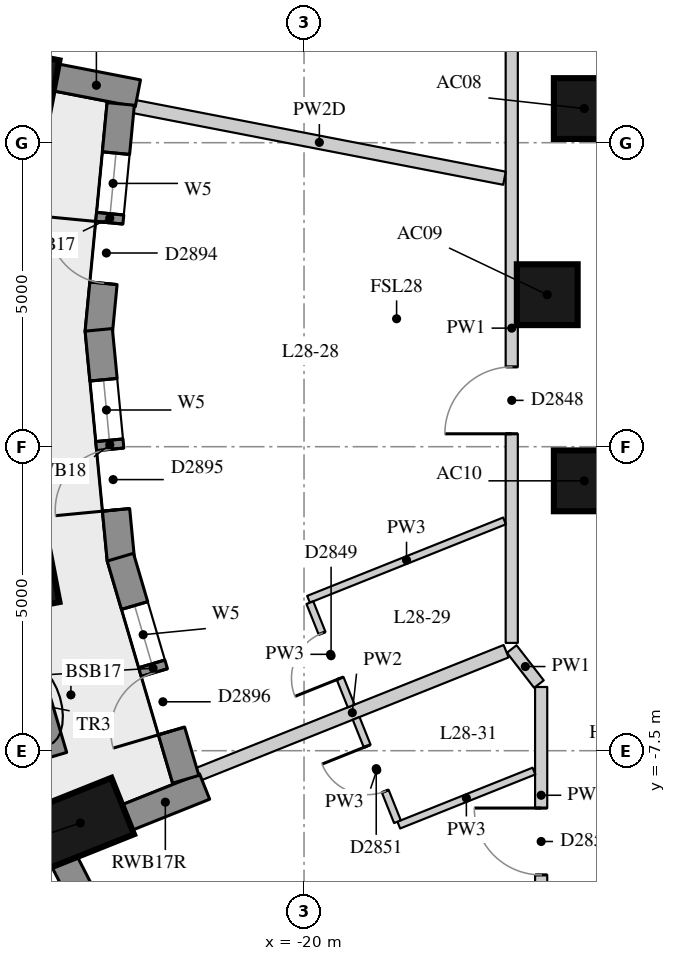
"""IFC4 building model, lengths in metres.
Left out: names, types, materials, properties, quantities, classifications, styles, units other than length and angle.
Written with IfcOpenShell. Run it as: python <this file> out.ifc"""

import sys

from ifc_helpers import new_model, si_unit, direction, frame, frame_2d, origin, origin_2d, place, context, subcontext, project, spatial, rectangle, extrude, element, fill, save


model = new_model("IFC4")
c1 = context("Model", 3, precision=1e-05, world=origin(), true_north=direction((0.0, 1.0)))
c2 = subcontext(c1, "Body", "Model", "MODEL_VIEW")
j1 = project(units=[si_unit("LENGTHUNIT", "METRE"), si_unit("PLANEANGLEUNIT", "RADIAN")], contexts=[c1])
p1 = place(None, origin())
s1 = spatial("IfcSite", under=j1, at=p1, CompositionType="ELEMENT")
p2 = place(p1, origin())
s2 = spatial("IfcBuilding", under=s1, at=p2, CompositionType="ELEMENT")
p3 = place(p2, frame((0.0, 0.0, 102.1)))
s3 = spatial("IfcBuildingStorey", under=s2, at=p3, CompositionType="ELEMENT", Elevation=102.1)
for number, where, z_axis, x_axis in (
    (1, (-24.854, 3.507, 0.0), (0.0, 0.0, 1.0), (-0.982, 0.19, 0.0)),
    (2, (-24.854, -4.707, 0.0), (0.0, 0.0, 1.0), (-0.982, -0.19, 0.0)),
    (3, (-23.679, -8.689, 0.0), (0.0, 0.0, 1.0), (-0.929, -0.371, 0.0)),
):
    element("IfcColumn", number, at=place(p3, frame(where, z_axis=z_axis, x_axis=x_axis)), inside=s3, PredefinedType="COLUMN", context=c2, shape_type="SweptSolid", body=[
        extrude(rectangle(XDim=1.5, YDim=1.0, at=origin_2d()), origin(), (0.0, 0.0, 1.0), 3.3),
    ])
for number, where, z_axis, x_axis in (
    (4, (-15.391, 3.062, 0.0), (0.0, 0.0, 1.0), (1.0, 0.0, 0.0)),
    (5, (-16.0, 0.0, 0.0), (0.0, 0.0, 1.0), (1.0, 0.0, 0.0)),
    (6, (-15.391, -3.062, 0.0), (0.0, 0.0, 1.0), (1.0, 0.0, 0.0)),
):
    element("IfcColumn", number, at=place(p3, frame(where, z_axis=z_axis, x_axis=x_axis)), inside=s3, PredefinedType="COLUMN", context=c2, shape_type="SweptSolid", body=[
        extrude(rectangle(XDim=1.0, YDim=1.0, at=origin_2d()), origin(), (0.0, 0.0, 1.0), 3.3),
    ])
p4 = place(p3, frame((-23.945, -9.312, 0.0), z_axis=(0.0, 0.0, 1.0), x_axis=(0.456828186229, -0.889554949549, 0.0)))
e7 = element("IfcWall", 7, at=p4, inside=s3, PredefinedType="SOLIDWALL", context=c2, shape_type="SweptSolid", body=[
    extrude(rectangle(XDim=3.333, YDim=0.45, at=frame_2d((1.667, 0.0))), origin(), (0.0, 0.0, 1.0), 3.02),
])
p5 = place(p4, frame((0.666, 0.0, 0.4)))
e8 = element("IfcOpeningElement", 8, at=p5, cuts=e7, PredefinedType="OPENING", context=c2, shape_type="SweptSolid", body=[
    extrude(rectangle(XDim=2.0, YDim=1.75, at=frame_2d((1.0, 0.875))), frame((0.0, 0.235, 0.0), z_axis=(0.0, -1.0, 0.0), x_axis=(1.0, 0.0, 0.0)), (0.0, 0.0, 1.0), 0.47),
])
p6 = place(p3, frame((-24.097, 3.576, 0.0), z_axis=(0.0, 0.0, 1.0), x_axis=(0.981777736615, -0.190032828447, 0.0)))
e9 = element("IfcWall", 9, at=p6, inside=s3, PredefinedType="SOLIDWALL", context=c2, shape_type="SweptSolid", body=[
    extrude(rectangle(XDim=1.39, YDim=0.45, at=frame_2d((0.695, 0.0))), origin(), (0.0, 0.0, 1.0), 2.47),
])
p7 = place(p3, frame((-22.926, -8.605, 0.0), z_axis=(0.0, 0.0, 1.0), x_axis=(0.928549333349, 0.371209018665, 0.0)))
e10 = element("IfcWall", 10, at=p7, inside=s3, PredefinedType="SOLIDWALL", context=c2, shape_type="SweptSolid", body=[
    extrude(rectangle(XDim=1.39, YDim=0.45, at=frame_2d((0.695, 0.0))), origin(), (0.0, 0.0, 1.0), 3.02),
])
p8 = place(p3, frame((-23.015, 3.138, 0.0), z_axis=(0.0, 0.0, 1.0), x_axis=(-0.095675452713, -0.995412581671, 0.0)))
e11 = element("IfcWall", 11, at=p8, inside=s3, PredefinedType="SOLIDWALL", context=c2, shape_type="SweptSolid", body=[
    extrude(rectangle(XDim=3.777, YDim=0.45, at=frame_2d((1.888, 0.0))), origin(), (0.0, 0.0, 1.0), 3.02),
])
p9 = place(p8, frame((0.813, 0.0, 0.4)))
e12 = element("IfcOpeningElement", 12, at=p9, cuts=e11, PredefinedType="OPENING", context=c2, shape_type="SweptSolid", body=[
    extrude(rectangle(XDim=1.0, YDim=1.75, at=frame_2d((0.5, 0.875))), frame((0.0, 0.235, 0.0), z_axis=(0.0, -1.0, 0.0), x_axis=(1.0, 0.0, 0.0)), (0.0, 0.0, 1.0), 0.47),
])
p10 = place(p8, frame((1.963, 0.0, 0.0)))
e13 = element("IfcOpeningElement", 13, at=p10, cuts=e11, PredefinedType="OPENING", context=c2, shape_type="SweptSolid", body=[
    extrude(rectangle(XDim=1.0, YDim=2.15, at=frame_2d((0.5, 1.075))), frame((0.0, 0.235, 0.0), z_axis=(0.0, -1.0, 0.0), x_axis=(1.0, 0.0, 0.0)), (0.0, 0.0, 1.0), 0.47),
])
p11 = place(p3, frame((-23.376, -0.578, 0.0), z_axis=(0.0, 0.0, 1.0), x_axis=(0.095646267275, -0.995415386437, 0.0)))
e14 = element("IfcWall", 14, at=p11, inside=s3, PredefinedType="SOLIDWALL", context=c2, shape_type="SweptSolid", body=[
    extrude(rectangle(XDim=3.798, YDim=0.45, at=frame_2d((1.899, 0.0))), origin(), (0.0, 0.0, 1.0), 3.02),
])
p12 = place(p11, frame((0.824, 0.0, 0.4)))
e15 = element("IfcOpeningElement", 15, at=p12, cuts=e14, PredefinedType="OPENING", context=c2, shape_type="SweptSolid", body=[
    extrude(rectangle(XDim=1.0, YDim=1.75, at=frame_2d((0.5, 0.875))), frame((0.0, 0.235, 0.0), z_axis=(0.0, -1.0, 0.0), x_axis=(1.0, 0.0, 0.0)), (0.0, 0.0, 1.0), 0.47),
])
p13 = place(p11, frame((1.974, 0.0, 0.0)))
e16 = element("IfcOpeningElement", 16, at=p13, cuts=e14, PredefinedType="OPENING", context=c2, shape_type="SweptSolid", body=[
    extrude(rectangle(XDim=1.0, YDim=2.15, at=frame_2d((0.5, 1.075))), frame((0.0, 0.235, 0.0), z_axis=(0.0, -1.0, 0.0), x_axis=(1.0, 0.0, 0.0)), (0.0, 0.0, 1.0), 0.47),
])
p14 = place(p3, frame((-23.021, -4.317, 0.0), z_axis=(0.0, 0.0, 1.0), x_axis=(0.282391916129, -0.959299122123, 0.0)))
e17 = element("IfcWall", 17, at=p14, inside=s3, PredefinedType="SOLIDWALL", context=c2, shape_type="SweptSolid", body=[
    extrude(rectangle(XDim=3.808, YDim=0.45, at=frame_2d((1.904, 0.0))), origin(), (0.0, 0.0, 1.0), 3.02),
])
p15 = place(p14, frame((0.829, 0.0, 0.4)))
e18 = element("IfcOpeningElement", 18, at=p15, cuts=e17, PredefinedType="OPENING", context=c2, shape_type="SweptSolid", body=[
    extrude(rectangle(XDim=1.0, YDim=1.75, at=frame_2d((0.5, 0.875))), frame((0.0, 0.235, 0.0), z_axis=(0.0, -1.0, 0.0), x_axis=(1.0, 0.0, 0.0)), (0.0, 0.0, 1.0), 0.47),
])
p16 = place(p14, frame((1.979, 0.0, 0.0)))
e19 = element("IfcOpeningElement", 19, at=p16, cuts=e17, PredefinedType="OPENING", context=c2, shape_type="SweptSolid", body=[
    extrude(rectangle(XDim=1.0, YDim=2.15, at=frame_2d((0.5, 1.075))), frame((0.0, 0.235, 0.0), z_axis=(0.0, -1.0, 0.0), x_axis=(1.0, 0.0, 0.0)), (0.0, 0.0, 1.0), 0.47),
])
p17 = place(p3, frame((-24.749, -5.901, 0.0), z_axis=(0.0, 0.0, 1.0), x_axis=(0.283076786659, -0.959097248904, 0.0)))
e20 = element("IfcWall", 20, at=p17, inside=s3, PredefinedType="USERDEFINED", context=c2, shape_type="SweptSolid", body=[
    extrude(rectangle(XDim=1.8, YDim=0.7, at=frame_2d((0.9, 0.0))), origin(), (0.0, 0.0, 1.0), 0.75),
])
p18 = place(p3, frame((-16.1, -10.013, 0.0), z_axis=(0.0, 0.0, 1.0), x_axis=(0.0, 1.0, 0.0)))
e21 = element("IfcWall", 21, at=p18, inside=s3, PredefinedType="PARTITIONING", context=c2, shape_type="SweptSolid", body=[
    extrude(rectangle(XDim=3.561, YDim=0.2, at=frame_2d((1.781, 0.0))), origin(), (0.0, 0.0, 1.0), 3.02),
])
p19 = place(p18, frame((0.47, 0.0, 0.0)))
e22 = element("IfcOpeningElement", 22, at=p19, cuts=e21, PredefinedType="OPENING", context=c2, shape_type="SweptSolid", body=[
    extrude(rectangle(XDim=1.1, YDim=2.1, at=frame_2d((0.55, 1.05))), frame((0.0, 0.11, 0.0), z_axis=(0.0, -1.0, 0.0), x_axis=(1.0, 0.0, 0.0)), (0.0, 0.0, 1.0), 0.22),
])
p20 = place(p3, frame((-16.137, -6.405, 0.0), z_axis=(0.0, 0.0, 1.0), x_axis=(-0.612388914667, 0.790556650211, 0.0)))
e23 = element("IfcWall", 23, at=p20, inside=s3, PredefinedType="PARTITIONING", context=c2, shape_type="SweptSolid", body=[
    extrude(rectangle(XDim=0.73, YDim=0.2, at=frame_2d((0.365, 0.0))), origin(), (0.0, 0.0, 1.0), 3.02),
])
p21 = place(p3, frame((-16.584, -5.727, 0.0), z_axis=(0.0, 0.0, 1.0), x_axis=(0.0, 1.0, 0.0)))
e24 = element("IfcWall", 24, at=p21, inside=s3, PredefinedType="PARTITIONING", context=c2, shape_type="SweptSolid", body=[
    extrude(rectangle(XDim=10.354, YDim=0.2, at=frame_2d((5.177, 0.0))), origin(), (0.0, 0.0, 1.0), 3.02),
])
p22 = place(p21, frame((3.439, 0.0, 0.0)))
e25 = element("IfcOpeningElement", 25, at=p22, cuts=e24, PredefinedType="OPENING", context=c2, shape_type="SweptSolid", body=[
    extrude(rectangle(XDim=1.1, YDim=2.1, at=frame_2d((0.55, 1.05))), frame((0.0, 0.11, 0.0), z_axis=(0.0, -1.0, 0.0), x_axis=(1.0, 0.0, 0.0)), (0.0, 0.0, 1.0), 0.22),
])
p23 = place(p3, frame((-22.793, 3.095, 0.0), z_axis=(0.0, 0.0, 1.0), x_axis=(0.98175994641, -0.190124715976, 0.0)))
e26 = element("IfcWall", 26, at=p23, inside=s3, PredefinedType="PARTITIONING", context=c2, shape_type="SweptSolid", body=[
    extrude(rectangle(XDim=6.202, YDim=0.22, at=frame_2d((3.101, 0.0))), origin(), (0.0, 0.0, 1.0), 2.47),
])
p24 = place(p3, frame((-21.736, -7.887, 0.0), z_axis=(0.0, 0.0, 1.0), x_axis=(0.928513770625, 0.371297963583, 0.0)))
e27 = element("IfcWall", 27, at=p24, inside=s3, PredefinedType="PARTITIONING", context=c2, shape_type="SweptSolid", body=[
    extrude(rectangle(XDim=5.448, YDim=0.22, at=frame_2d((2.724, 0.0))), origin(), (0.0, 0.0, 1.0), 3.02),
])
p25 = place(p3, frame((-16.703, -3.721, 0.0), z_axis=(0.0, 0.0, 1.0), x_axis=(-0.928539725362, -0.371233051362, 0.0)))
e28 = element("IfcWall", 28, at=p25, inside=s3, PredefinedType="PARTITIONING", context=c2, shape_type="SweptSolid", body=[
    extrude(rectangle(XDim=3.472, YDim=0.12, at=frame_2d((1.736, 0.0))), origin(), (0.0, 0.0, 1.0), 3.02),
])
p26 = place(p3, frame((-16.219, -7.835, 0.0), z_axis=(0.0, 0.0, 1.0), x_axis=(-0.928532951542, -0.371249993806, 0.0)))
e29 = element("IfcWall", 29, at=p26, inside=s3, PredefinedType="PARTITIONING", context=c2, shape_type="SweptSolid", body=[
    extrude(rectangle(XDim=2.394, YDim=0.12, at=frame_2d((1.197, 0.0))), origin(), (0.0, 0.0, 1.0), 3.02),
])
p27 = place(p3, frame((-19.904, -5.065, 0.0), z_axis=(0.0, 0.0, 1.0), x_axis=(0.371275666236, -0.92852268667, 0.0)))
e30 = element("IfcWall", 30, at=p27, inside=s3, PredefinedType="PARTITIONING", context=c2, shape_type="SweptSolid", body=[
    extrude(rectangle(XDim=1.83, YDim=0.12, at=frame_2d((0.915, 0.0))), origin(), (0.0, 0.0, 1.0), 3.02),
])
p28 = place(p27, frame((0.54, 0.0, 0.0)))
e31 = element("IfcOpeningElement", 31, at=p28, cuts=e30, PredefinedType="OPENING", context=c2, shape_type="SweptSolid", body=[
    extrude(rectangle(XDim=0.8, YDim=2.1, at=frame_2d((0.4, 1.05))), frame((0.0, 0.07, 0.0), z_axis=(0.0, -1.0, 0.0), x_axis=(1.0, 0.0, 0.0)), (0.0, 0.0, 1.0), 0.14),
])
p29 = place(p3, frame((-18.464, -8.668, 0.0), z_axis=(0.0, 0.0, 1.0), x_axis=(-0.371275666236, 0.92852268667, 0.0)))
e32 = element("IfcWall", 32, at=p29, inside=s3, PredefinedType="PARTITIONING", context=c2, shape_type="SweptSolid", body=[
    extrude(rectangle(XDim=1.83, YDim=0.12, at=frame_2d((0.915, 0.0))), origin(), (0.0, 0.0, 1.0), 3.02),
])
p30 = place(p29, frame((0.54, 0.0, 0.0)))
e33 = element("IfcOpeningElement", 33, at=p30, cuts=e32, PredefinedType="OPENING", context=c2, shape_type="SweptSolid", body=[
    extrude(rectangle(XDim=0.8, YDim=2.1, at=frame_2d((0.4, 1.05))), frame((0.0, 0.07, 0.0), z_axis=(0.0, -1.0, 0.0), x_axis=(1.0, 0.0, 0.0)), (0.0, 0.0, 1.0), 0.14),
])
p31 = place(p9, origin())
e34 = element("IfcWindow", 34, at=p31, inside=s3, PartitioningType="SINGLE_PANEL", PredefinedType="WINDOW", context=c2, shape_type="SweptSolid", body=[
    extrude(rectangle(XDim=1.0, YDim=1.75, at=frame_2d((0.5, 0.875))), frame((0.0, 0.035, 0.0), z_axis=(0.0, -1.0, 0.0), x_axis=(1.0, 0.0, 0.0)), (0.0, 0.0, 1.0), 0.06),
])
fill(e12, e34)
p32 = place(p10, frame((1.0, 0.0, 0.0), z_axis=(0.0, 0.0, 1.0), x_axis=(-1.0, 0.0, 0.0)))
e35 = element("IfcDoor", 35, at=p32, inside=s3, OperationType="SINGLE_SWING_RIGHT", PredefinedType="DOOR", context=c2, shape_type="SweptSolid", body=[
    extrude(rectangle(XDim=1.0, YDim=2.15, at=frame_2d((0.5, 1.075))), frame((0.0, 0.075, 0.0), z_axis=(0.0, -1.0, 0.0), x_axis=(1.0, 0.0, 0.0)), (0.0, 0.0, 1.0), 0.05),
])
fill(e13, e35)
p33 = place(p12, origin())
e36 = element("IfcWindow", 36, at=p33, inside=s3, PartitioningType="SINGLE_PANEL", PredefinedType="WINDOW", context=c2, shape_type="SweptSolid", body=[
    extrude(rectangle(XDim=1.0, YDim=1.75, at=frame_2d((0.5, 0.875))), frame((0.0, 0.035, 0.0), z_axis=(0.0, -1.0, 0.0), x_axis=(1.0, 0.0, 0.0)), (0.0, 0.0, 1.0), 0.06),
])
fill(e15, e36)
p34 = place(p13, frame((1.0, 0.0, 0.0), z_axis=(0.0, 0.0, 1.0), x_axis=(-1.0, 0.0, 0.0)))
e37 = element("IfcDoor", 37, at=p34, inside=s3, OperationType="SINGLE_SWING_LEFT", PredefinedType="DOOR", context=c2, shape_type="SweptSolid", body=[
    extrude(rectangle(XDim=1.0, YDim=2.15, at=frame_2d((0.5, 1.075))), frame((0.0, 0.075, 0.0), z_axis=(0.0, -1.0, 0.0), x_axis=(1.0, 0.0, 0.0)), (0.0, 0.0, 1.0), 0.05),
])
fill(e16, e37)
p35 = place(p15, origin())
e38 = element("IfcWindow", 38, at=p35, inside=s3, PartitioningType="SINGLE_PANEL", PredefinedType="WINDOW", context=c2, shape_type="SweptSolid", body=[
    extrude(rectangle(XDim=1.0, YDim=1.75, at=frame_2d((0.5, 0.875))), frame((0.0, 0.035, 0.0), z_axis=(0.0, -1.0, 0.0), x_axis=(1.0, 0.0, 0.0)), (0.0, 0.0, 1.0), 0.06),
])
fill(e18, e38)
p36 = place(p16, frame((1.0, 0.0, 0.0), z_axis=(0.0, 0.0, 1.0), x_axis=(-1.0, 0.0, 0.0)))
e39 = element("IfcDoor", 39, at=p36, inside=s3, OperationType="SINGLE_SWING_LEFT", PredefinedType="DOOR", context=c2, shape_type="SweptSolid", body=[
    extrude(rectangle(XDim=1.0, YDim=2.15, at=frame_2d((0.5, 1.075))), frame((0.0, 0.075, 0.0), z_axis=(0.0, -1.0, 0.0), x_axis=(1.0, 0.0, 0.0)), (0.0, 0.0, 1.0), 0.05),
])
fill(e19, e39)
p37 = place(p22, origin())
e40 = element("IfcDoor", 40, at=p37, inside=s3, OperationType="SINGLE_SWING_LEFT", PredefinedType="DOOR", context=c2, shape_type="SweptSolid", body=[
    extrude(rectangle(XDim=1.1, YDim=2.1, at=frame_2d((0.55, 1.05))), frame((0.0, 0.025, 0.0), z_axis=(0.0, -1.0, 0.0), x_axis=(1.0, 0.0, 0.0)), (0.0, 0.0, 1.0), 0.05),
])
fill(e25, e40)
p38 = place(p28, origin())
e41 = element("IfcDoor", 41, at=p38, inside=s3, OperationType="SINGLE_SWING_LEFT", PredefinedType="DOOR", context=c2, shape_type="SweptSolid", body=[
    extrude(rectangle(XDim=0.8, YDim=2.1, at=frame_2d((0.4, 1.05))), frame((0.0, 0.025, 0.0), z_axis=(0.0, -1.0, 0.0), x_axis=(1.0, 0.0, 0.0)), (0.0, 0.0, 1.0), 0.05),
])
fill(e31, e41)
p39 = place(p19, origin())
e42 = element("IfcDoor", 42, at=p39, inside=s3, OperationType="SINGLE_SWING_RIGHT", PredefinedType="DOOR", context=c2, shape_type="SweptSolid", body=[
    extrude(rectangle(XDim=1.1, YDim=2.1, at=frame_2d((0.55, 1.05))), frame((0.0, 0.025, 0.0), z_axis=(0.0, -1.0, 0.0), x_axis=(1.0, 0.0, 0.0)), (0.0, 0.0, 1.0), 0.05),
])
fill(e22, e42)
p40 = place(p30, origin())
e43 = element("IfcDoor", 43, at=p40, inside=s3, OperationType="SINGLE_SWING_RIGHT", PredefinedType="DOOR", context=c2, shape_type="SweptSolid", body=[
    extrude(rectangle(XDim=0.8, YDim=2.1, at=frame_2d((0.4, 1.05))), frame((0.0, 0.025, 0.0), z_axis=(0.0, -1.0, 0.0), x_axis=(1.0, 0.0, 0.0)), (0.0, 0.0, 1.0), 0.05),
])
fill(e33, e43)
save(model, sys.argv[1])
